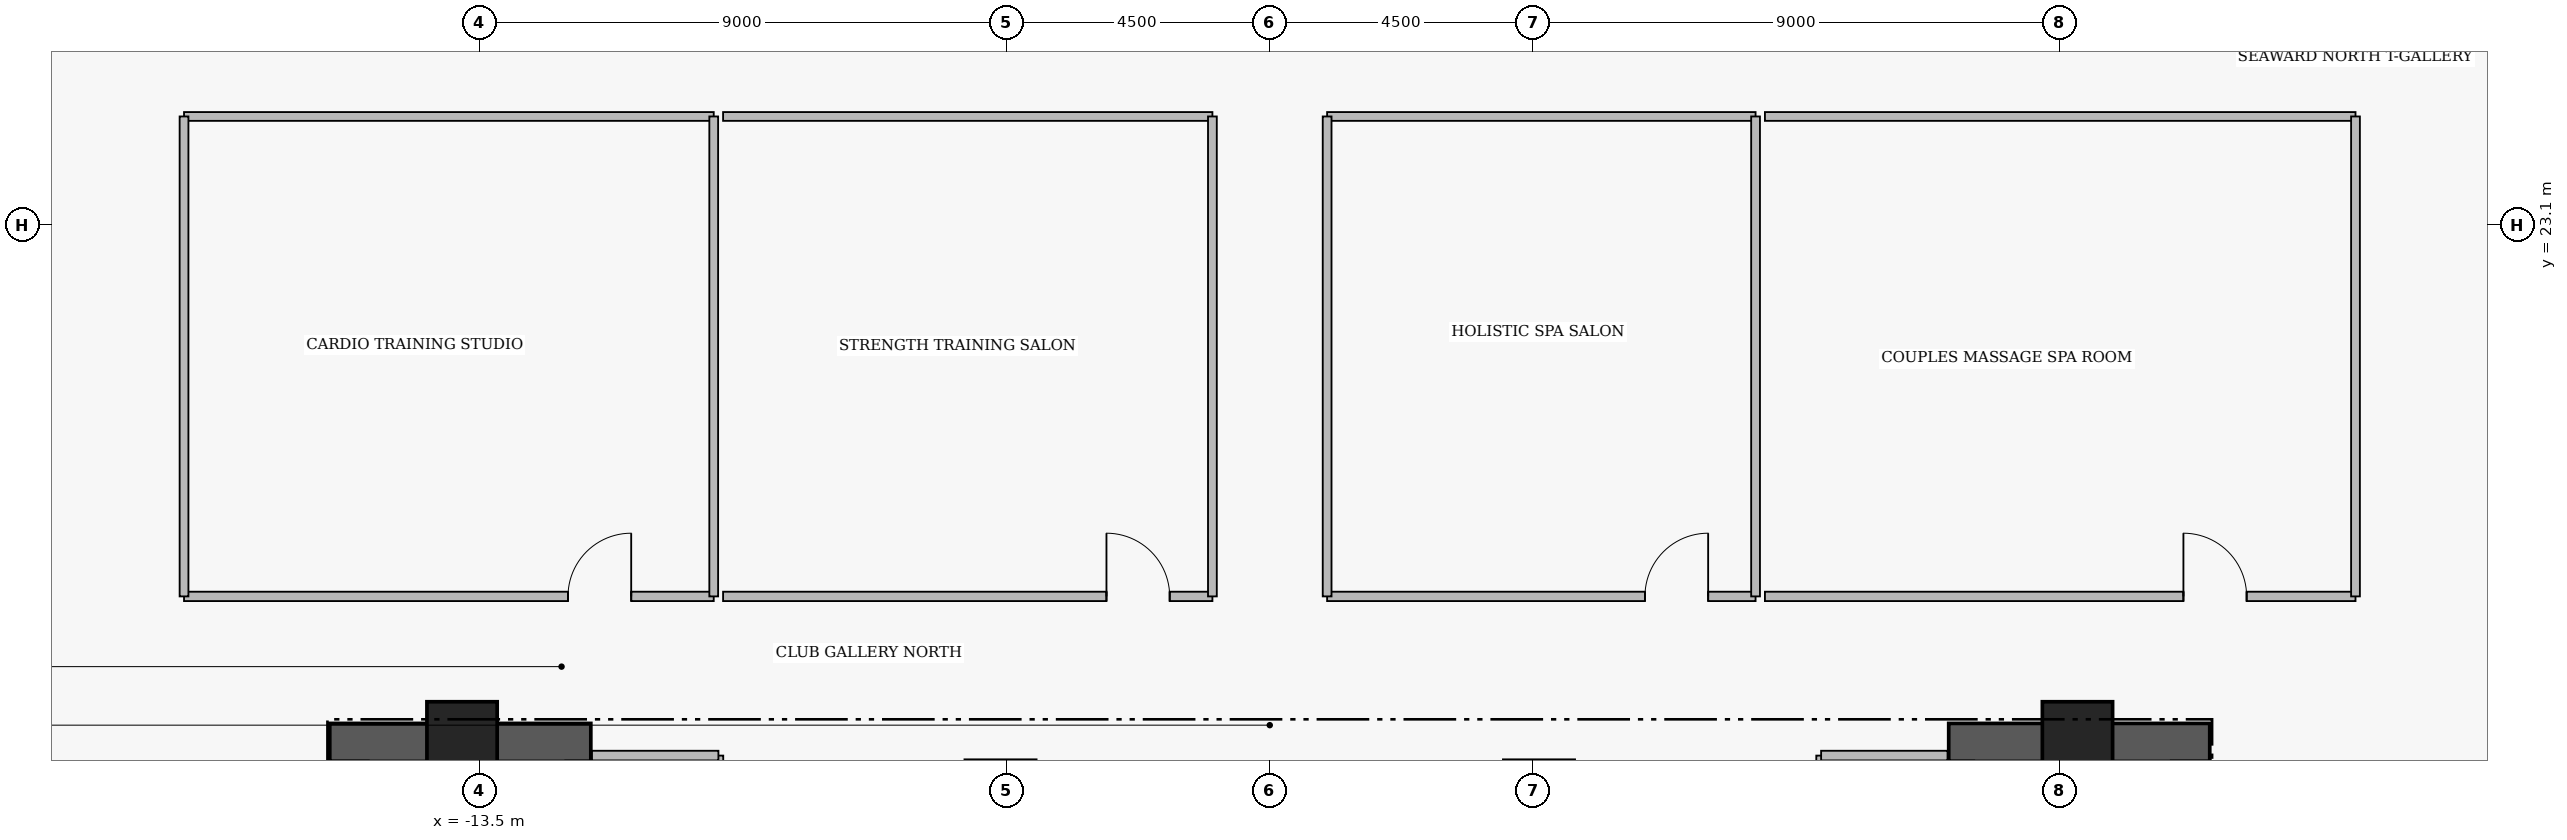
"""IFC4 building model, lengths in metres.
Left out: names, types, materials, properties, quantities, classifications, styles, units other than length and angle.
Written with IfcOpenShell. Run it as: python <this file> out.ifc"""

import sys

from ifc_helpers import new_model, si_unit, direction, frame, frame_2d, origin, origin_2d, place, context, subcontext, project, spatial, rectangle, extrude, element, fill, save


model = new_model("IFC4")
c1 = context("Model", 3, precision=1e-05, world=origin(), true_north=direction((0.0, 1.0)))
c2 = subcontext(c1, "Body", "Model", "MODEL_VIEW")
j1 = project(units=[si_unit("LENGTHUNIT", "METRE"), si_unit("PLANEANGLEUNIT", "RADIAN")], contexts=[c1])
p1 = place(None, origin())
s1 = spatial("IfcSite", under=j1, at=p1, CompositionType="ELEMENT")
p2 = place(p1, origin())
s2 = spatial("IfcBuilding", under=s1, at=p2, CompositionType="ELEMENT")
p3 = place(p2, frame((0.0, 0.0, 172.8)))
s3 = spatial("IfcBuildingStorey", under=s2, at=p3, CompositionType="ELEMENT", Elevation=172.8)
for number, where, z_axis, x_axis in (
    (1, (-16.06, 14.255, 0.0), (0.0, 0.0, 1.0), (1.0, 0.0, 0.0)),
    (2, (11.6, 14.255, 0.0), (0.0, 0.0, 1.0), (1.0, 0.0, 0.0)),
):
    element("IfcWall", number, at=place(p3, frame(where, z_axis=z_axis, x_axis=x_axis)), inside=s3, PredefinedType="SHEAR", context=c2, shape_type="SweptSolid", body=[
        extrude(rectangle(XDim=4.46, YDim=0.65, at=frame_2d((2.23, 0.0))), origin(), (0.0, 0.0, 1.0), 4.41),
    ])
for number, where, z_axis, x_axis in (
    (3, (-13.8, 14.35, 0.0), (0.0, 0.0, 1.0), (1.0, 0.0, 0.0)),
    (4, (-4.6, 13.35, 0.0), (0.0, 0.0, 1.0), (1.0, 0.0, 0.0)),
    (5, (4.6, 13.35, 0.0), (0.0, 0.0, 1.0), (1.0, 0.0, 0.0)),
    (6, (13.8, 14.35, 0.0), (0.0, 0.0, 1.0), (1.0, 0.0, 0.0)),
):
    element("IfcColumn", number, at=place(p3, frame(where, z_axis=z_axis, x_axis=x_axis)), inside=s3, PredefinedType="COLUMN", context=c2, shape_type="SweptSolid", body=[
        extrude(rectangle(XDim=1.2, YDim=1.2, at=origin_2d()), origin(), (0.0, 0.0, 1.0), 4.6),
    ])
p4 = place(p3, frame((-18.55, 16.75, 0.0), z_axis=(0.0, 0.0, 1.0), x_axis=(1.0, 0.0, 0.0)))
e7 = element("IfcWall", 7, at=p4, inside=s3, PredefinedType="PARTITIONING", context=c2, shape_type="SweptSolid", body=[
    extrude(rectangle(XDim=9.05, YDim=0.16, at=frame_2d((4.525, 0.0))), origin(), (0.0, 0.0, 1.0), 3.974),
])
p5 = place(p4, frame((6.56, 0.0, 0.0)))
e8 = element("IfcOpeningElement", 8, at=p5, cuts=e7, PredefinedType="OPENING", context=c2, shape_type="SweptSolid", body=[
    extrude(rectangle(XDim=1.08, YDim=2.18, at=frame_2d((0.54, 1.09))), frame((0.0, 0.09, 0.0), z_axis=(0.0, -1.0, 0.0), x_axis=(1.0, 0.0, 0.0)), (0.0, 0.0, 1.0), 0.18),
])
p6 = place(p3, frame((-9.34, 16.75, 0.0), z_axis=(0.0, 0.0, 1.0), x_axis=(1.0, 0.0, 0.0)))
e9 = element("IfcWall", 9, at=p6, inside=s3, PredefinedType="PARTITIONING", context=c2, shape_type="SweptSolid", body=[
    extrude(rectangle(XDim=8.36, YDim=0.16, at=frame_2d((4.18, 0.0))), origin(), (0.0, 0.0, 1.0), 3.974),
])
p7 = place(p6, frame((6.55, 0.0, 0.0)))
e10 = element("IfcOpeningElement", 10, at=p7, cuts=e9, PredefinedType="OPENING", context=c2, shape_type="SweptSolid", body=[
    extrude(rectangle(XDim=1.08, YDim=2.18, at=frame_2d((0.54, 1.09))), frame((0.0, 0.09, 0.0), z_axis=(0.0, -1.0, 0.0), x_axis=(1.0, 0.0, 0.0)), (0.0, 0.0, 1.0), 0.18),
])
p8 = place(p3, frame((0.98, 16.75, 0.0), z_axis=(0.0, 0.0, 1.0), x_axis=(1.0, 0.0, 0.0)))
e11 = element("IfcWall", 11, at=p8, inside=s3, PredefinedType="PARTITIONING", context=c2, shape_type="SweptSolid", body=[
    extrude(rectangle(XDim=7.32, YDim=0.16, at=frame_2d((3.66, 0.0))), origin(), (0.0, 0.0, 1.0), 3.974),
])
p9 = place(p8, frame((5.43, 0.0, 0.0)))
e12 = element("IfcOpeningElement", 12, at=p9, cuts=e11, PredefinedType="OPENING", context=c2, shape_type="SweptSolid", body=[
    extrude(rectangle(XDim=1.08, YDim=2.18, at=frame_2d((0.54, 1.09))), frame((0.0, 0.09, 0.0), z_axis=(0.0, -1.0, 0.0), x_axis=(1.0, 0.0, 0.0)), (0.0, 0.0, 1.0), 0.18),
])
p10 = place(p3, frame((8.46, 16.75, 0.0), z_axis=(0.0, 0.0, 1.0), x_axis=(1.0, 0.0, 0.0)))
e13 = element("IfcWall", 13, at=p10, inside=s3, PredefinedType="PARTITIONING", context=c2, shape_type="SweptSolid", body=[
    extrude(rectangle(XDim=10.09, YDim=0.16, at=frame_2d((5.045, 0.0))), origin(), (0.0, 0.0, 1.0), 3.974),
])
p11 = place(p10, frame((7.15, 0.0, 0.0)))
e14 = element("IfcOpeningElement", 14, at=p11, cuts=e13, PredefinedType="OPENING", context=c2, shape_type="SweptSolid", body=[
    extrude(rectangle(XDim=1.08, YDim=2.18, at=frame_2d((0.54, 1.09))), frame((0.0, 0.09, 0.0), z_axis=(0.0, -1.0, 0.0), x_axis=(1.0, 0.0, 0.0)), (0.0, 0.0, 1.0), 0.18),
])
p12 = place(p3, frame((-9.42, 11.07, 0.0), z_axis=(0.0, 0.0, 1.0), x_axis=(0.0, 1.0, 0.0)))
e15 = element("IfcWall", 15, at=p12, inside=s3, PredefinedType="PARTITIONING", context=c2, shape_type="SweptSolid", body=[
    extrude(rectangle(XDim=2.96, YDim=0.165, at=frame_2d((1.48, 0.0))), origin(), (0.0, 0.0, 1.0), 4.38),
])
p13 = place(p3, frame((-11.58, 14.03, 0.0), z_axis=(0.0, 0.0, 1.0), x_axis=(1.0, 0.0, 0.0)))
e16 = element("IfcWall", 16, at=p13, inside=s3, PredefinedType="PARTITIONING", context=c2, shape_type="SweptSolid", body=[
    extrude(rectangle(XDim=2.16, YDim=0.165, at=frame_2d((1.08, 0.0))), origin(), (0.0, 0.0, 1.0), 4.38),
])
p14 = place(p3, frame((9.42, 11.07, 0.0), z_axis=(0.0, 0.0, 1.0), x_axis=(0.0, 1.0, 0.0)))
e17 = element("IfcWall", 17, at=p14, inside=s3, PredefinedType="PARTITIONING", context=c2, shape_type="SweptSolid", body=[
    extrude(rectangle(XDim=2.96, YDim=0.165, at=frame_2d((1.48, 0.0))), origin(), (0.0, 0.0, 1.0), 4.38),
])
p15 = place(p3, frame((9.42, 14.03, 0.0), z_axis=(0.0, 0.0, 1.0), x_axis=(1.0, 0.0, 0.0)))
e18 = element("IfcWall", 18, at=p15, inside=s3, PredefinedType="PARTITIONING", context=c2, shape_type="SweptSolid", body=[
    extrude(rectangle(XDim=2.16, YDim=0.165, at=frame_2d((1.08, 0.0))), origin(), (0.0, 0.0, 1.0), 4.38),
])
p16 = place(p3, frame((-18.55, 24.95, 0.0), z_axis=(0.0, 0.0, 1.0), x_axis=(1.0, 0.0, 0.0)))
e19 = element("IfcWall", 19, at=p16, inside=s3, PredefinedType="PARTITIONING", context=c2, shape_type="SweptSolid", body=[
    extrude(rectangle(XDim=9.05, YDim=0.15, at=frame_2d((4.525, 0.0))), origin(), (0.0, 0.0, 1.0), 3.974),
])
for number, where, z_axis, x_axis in (
    (20, (-18.55, 16.75, 0.0), (0.0, 0.0, 1.0), (0.0, 1.0, 0.0)),
    (21, (-9.5, 16.75, 0.0), (0.0, 0.0, 1.0), (0.0, 1.0, 0.0)),
):
    element("IfcWall", number, at=place(p3, frame(where, z_axis=z_axis, x_axis=x_axis)), inside=s3, PredefinedType="PARTITIONING", context=c2, shape_type="SweptSolid", body=[
        extrude(rectangle(XDim=8.2, YDim=0.15, at=frame_2d((4.1, 0.0))), origin(), (0.0, 0.0, 1.0), 4.38),
    ])
p17 = place(p3, frame((-9.34, 24.95, 0.0), z_axis=(0.0, 0.0, 1.0), x_axis=(1.0, 0.0, 0.0)))
e22 = element("IfcWall", 22, at=p17, inside=s3, PredefinedType="PARTITIONING", context=c2, shape_type="SweptSolid", body=[
    extrude(rectangle(XDim=8.36, YDim=0.15, at=frame_2d((4.18, 0.0))), origin(), (0.0, 0.0, 1.0), 3.974),
])
p18 = place(p3, frame((-0.98, 16.75, 0.0), z_axis=(0.0, 0.0, 1.0), x_axis=(0.0, 1.0, 0.0)))
e23 = element("IfcWall", 23, at=p18, inside=s3, PredefinedType="PARTITIONING", context=c2, shape_type="SweptSolid", body=[
    extrude(rectangle(XDim=8.2, YDim=0.15, at=frame_2d((4.1, 0.0))), origin(), (0.0, 0.0, 1.0), 4.38),
])
p19 = place(p3, frame((0.98, 24.95, 0.0), z_axis=(0.0, 0.0, 1.0), x_axis=(1.0, 0.0, 0.0)))
e24 = element("IfcWall", 24, at=p19, inside=s3, PredefinedType="PARTITIONING", context=c2, shape_type="SweptSolid", body=[
    extrude(rectangle(XDim=7.32, YDim=0.15, at=frame_2d((3.66, 0.0))), origin(), (0.0, 0.0, 1.0), 3.974),
])
for number, where, z_axis, x_axis in (
    (25, (0.98, 16.75, 0.0), (0.0, 0.0, 1.0), (0.0, 1.0, 0.0)),
    (26, (8.3, 16.75, 0.0), (0.0, 0.0, 1.0), (0.0, 1.0, 0.0)),
):
    element("IfcWall", number, at=place(p3, frame(where, z_axis=z_axis, x_axis=x_axis)), inside=s3, PredefinedType="PARTITIONING", context=c2, shape_type="SweptSolid", body=[
        extrude(rectangle(XDim=8.2, YDim=0.15, at=frame_2d((4.1, 0.0))), origin(), (0.0, 0.0, 1.0), 4.38),
    ])
p20 = place(p3, frame((8.46, 24.95, 0.0), z_axis=(0.0, 0.0, 1.0), x_axis=(1.0, 0.0, 0.0)))
e27 = element("IfcWall", 27, at=p20, inside=s3, PredefinedType="PARTITIONING", context=c2, shape_type="SweptSolid", body=[
    extrude(rectangle(XDim=10.09, YDim=0.15, at=frame_2d((5.045, 0.0))), origin(), (0.0, 0.0, 1.0), 3.974),
])
p21 = place(p3, frame((18.55, 16.75, 0.0), z_axis=(0.0, 0.0, 1.0), x_axis=(0.0, 1.0, 0.0)))
e28 = element("IfcWall", 28, at=p21, inside=s3, PredefinedType="PARTITIONING", context=c2, shape_type="SweptSolid", body=[
    extrude(rectangle(XDim=8.2, YDim=0.15, at=frame_2d((4.1, 0.0))), origin(), (0.0, 0.0, 1.0), 4.38),
])
p22 = place(p5, origin())
e29 = element("IfcDoor", 29, at=p22, inside=s3, OperationType="SINGLE_SWING_RIGHT", PredefinedType="DOOR", context=c2, shape_type="SweptSolid", body=[
    extrude(rectangle(XDim=1.08, YDim=2.18, at=frame_2d((0.54, 1.09))), frame((0.0, 0.025, 0.0), z_axis=(0.0, -1.0, 0.0), x_axis=(1.0, 0.0, 0.0)), (0.0, 0.0, 1.0), 0.05),
])
fill(e8, e29)
p23 = place(p7, origin())
e30 = element("IfcDoor", 30, at=p23, inside=s3, OperationType="SINGLE_SWING_LEFT", PredefinedType="DOOR", context=c2, shape_type="SweptSolid", body=[
    extrude(rectangle(XDim=1.08, YDim=2.18, at=frame_2d((0.54, 1.09))), frame((0.0, 0.025, 0.0), z_axis=(0.0, -1.0, 0.0), x_axis=(1.0, 0.0, 0.0)), (0.0, 0.0, 1.0), 0.05),
])
fill(e10, e30)
p24 = place(p9, origin())
e31 = element("IfcDoor", 31, at=p24, inside=s3, OperationType="SINGLE_SWING_RIGHT", PredefinedType="DOOR", context=c2, shape_type="SweptSolid", body=[
    extrude(rectangle(XDim=1.08, YDim=2.18, at=frame_2d((0.54, 1.09))), frame((0.0, 0.025, 0.0), z_axis=(0.0, -1.0, 0.0), x_axis=(1.0, 0.0, 0.0)), (0.0, 0.0, 1.0), 0.05),
])
fill(e12, e31)
p25 = place(p11, origin())
e32 = element("IfcDoor", 32, at=p25, inside=s3, OperationType="SINGLE_SWING_LEFT", PredefinedType="DOOR", context=c2, shape_type="SweptSolid", body=[
    extrude(rectangle(XDim=1.08, YDim=2.18, at=frame_2d((0.54, 1.09))), frame((0.0, 0.025, 0.0), z_axis=(0.0, -1.0, 0.0), x_axis=(1.0, 0.0, 0.0)), (0.0, 0.0, 1.0), 0.05),
])
fill(e14, e32)
save(model, sys.argv[1])
